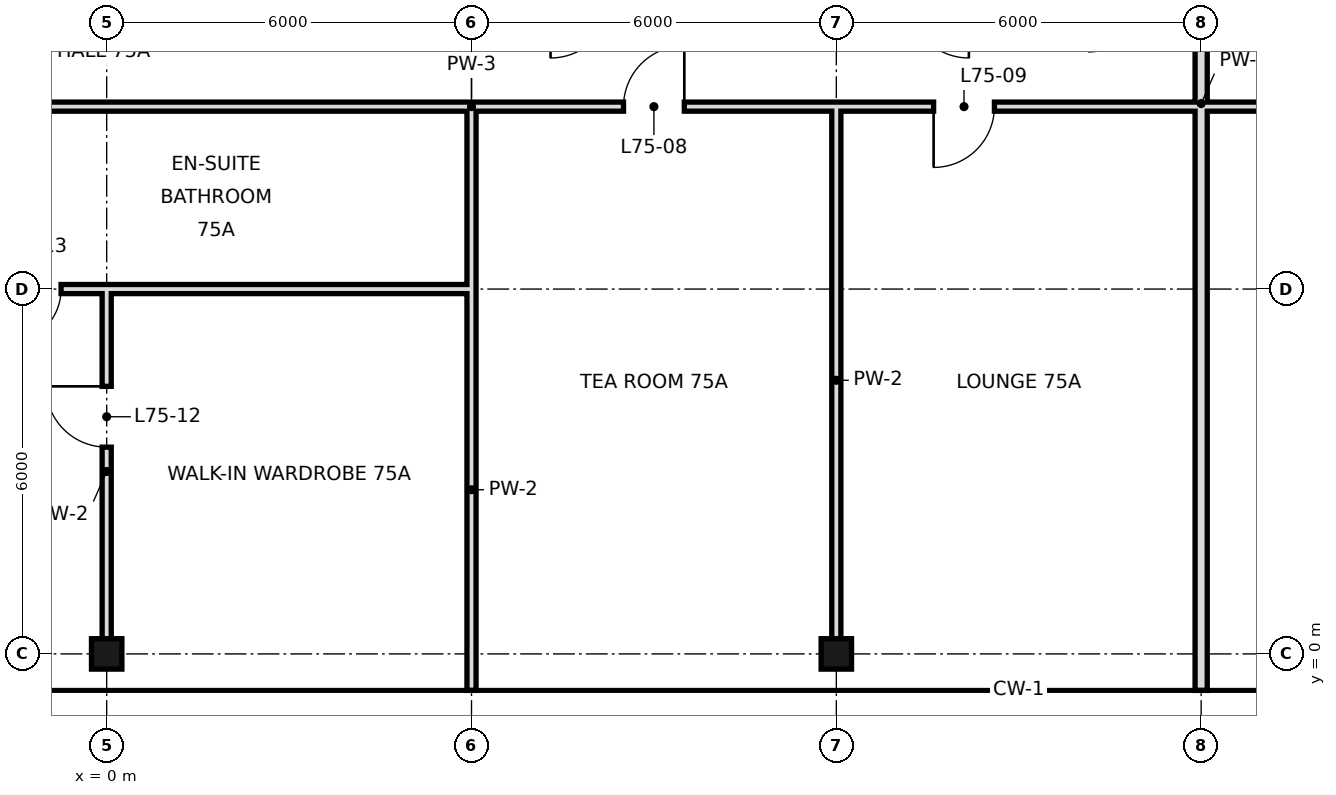
"""IFC4 building model, lengths in metres.
Left out: names, types, materials, properties, quantities, classifications, styles, units other than length and angle.
Written with IfcOpenShell. Run it as: python <this file> out.ifc"""

import sys

from ifc_helpers import new_model, si_unit, direction, frame, frame_2d, origin, origin_2d, place, context, subcontext, project, spatial, rectangle, hollow_rectangle, extrude, element, fill, save


model = new_model("IFC4")
c1 = context("Model", 3, precision=1e-05, world=origin(), true_north=direction((0.0, 1.0)))
c2 = subcontext(c1, "Body", "Model", "MODEL_VIEW")
j1 = project(units=[si_unit("LENGTHUNIT", "METRE"), si_unit("PLANEANGLEUNIT", "RADIAN")], contexts=[c1])
p1 = place(None, origin())
s1 = spatial("IfcSite", under=j1, at=p1, CompositionType="ELEMENT")
p2 = place(p1, origin())
s2 = spatial("IfcBuilding", under=s1, at=p2, CompositionType="ELEMENT")
p3 = place(p2, frame((0.0, 0.0, 316.0)))
s3 = spatial("IfcBuildingStorey", under=s2, at=p3, CompositionType="ELEMENT", Elevation=316.0)
for number, where, z_axis, x_axis in (
    (1, (0.0, 0.0, 0.0), (0.0, 0.0, 1.0), (1.0, 0.0, 0.0)),
    (2, (12.0, 0.0, 0.0), (0.0, 0.0, 1.0), (1.0, 0.0, 0.0)),
):
    element("IfcColumn", number, at=place(p3, frame(where, z_axis=z_axis, x_axis=x_axis)), inside=s3, PredefinedType="COLUMN", context=c2, shape_type="SweptSolid", body=[
        extrude(hollow_rectangle(XDim=0.5, YDim=0.5, WallThickness=0.025, at=origin_2d()), origin(), (0.0, 0.0, 1.0), 3.6),
    ])
p4 = place(p3, frame((0.0, 0.0, 0.0), z_axis=(0.0, 0.0, 1.0), x_axis=(0.0, 1.0, 0.0)))
e3 = element("IfcWall", 3, at=p4, inside=s3, PredefinedType="PARTITIONING", context=c2, shape_type="SweptSolid", body=[
    extrude(rectangle(XDim=6.0, YDim=0.15, at=frame_2d((3.0, 0.0))), origin(), (0.0, 0.0, 1.0), 2.72),
])
p5 = place(p4, frame((3.4, 0.0, 0.0)))
e4 = element("IfcOpeningElement", 4, at=p5, cuts=e3, PredefinedType="OPENING", context=c2, shape_type="SweptSolid", body=[
    extrude(rectangle(XDim=1.0, YDim=2.4, at=frame_2d((0.5, 1.2))), frame((0.0, 0.085, 0.0), z_axis=(0.0, -1.0, 0.0), x_axis=(1.0, 0.0, 0.0)), (0.0, 0.0, 1.0), 0.17),
])
p6 = place(p3, frame((12.0, 0.0, 0.0), z_axis=(0.0, 0.0, 1.0), x_axis=(0.0, 1.0, 0.0)))
e5 = element("IfcWall", 5, at=p6, inside=s3, PredefinedType="PARTITIONING", context=c2, shape_type="SweptSolid", body=[
    extrude(rectangle(XDim=9.0, YDim=0.15, at=frame_2d((4.5, 0.0))), origin(), (0.0, 0.0, 1.0), 2.72),
])
p7 = place(p3, frame((18.0, -0.6, 0.0), z_axis=(0.0, 0.0, 1.0), x_axis=(0.0, 1.0, 0.0)))
e6 = element("IfcWall", 6, at=p7, inside=s3, PredefinedType="SOLIDWALL", context=c2, shape_type="SweptSolid", body=[
    extrude(rectangle(XDim=19.3, YDim=0.2, at=frame_2d((9.65, 0.0))), origin(), (0.0, 0.0, 1.0), 2.72),
])
p8 = place(p3, frame((6.0, -0.6, 0.0), z_axis=(0.0, 0.0, 1.0), x_axis=(0.0, 1.0, 0.0)))
e7 = element("IfcWall", 7, at=p8, inside=s3, PredefinedType="PARTITIONING", context=c2, shape_type="SweptSolid", body=[
    extrude(rectangle(XDim=6.6, YDim=0.15, at=frame_2d((3.3, 0.0))), origin(), (0.0, 0.0, 1.0), 3.42),
])
p9 = place(p3, frame((6.0, 6.0, 0.0), z_axis=(0.0, 0.0, 1.0), x_axis=(0.0, 1.0, 0.0)))
e8 = element("IfcWall", 8, at=p9, inside=s3, PredefinedType="PARTITIONING", context=c2, shape_type="SweptSolid", body=[
    extrude(rectangle(XDim=3.0, YDim=0.15, at=frame_2d((1.5, 0.0))), origin(), (0.0, 0.0, 1.0), 3.42),
])
p10 = place(p3, frame((-2.4, 6.0, 0.0), z_axis=(0.0, 0.0, 1.0), x_axis=(1.0, 0.0, 0.0)))
e9 = element("IfcWall", 9, at=p10, inside=s3, PredefinedType="PARTITIONING", context=c2, shape_type="SweptSolid", body=[
    extrude(rectangle(XDim=8.4, YDim=0.15, at=frame_2d((4.2, 0.0))), origin(), (0.0, 0.0, 1.0), 2.72),
])
p11 = place(p10, frame((0.75, 0.0, 0.0)))
e10 = element("IfcOpeningElement", 10, at=p11, cuts=e9, PredefinedType="OPENING", context=c2, shape_type="SweptSolid", body=[
    extrude(rectangle(XDim=0.9, YDim=2.4, at=frame_2d((0.45, 1.2))), frame((0.0, 0.085, 0.0), z_axis=(0.0, -1.0, 0.0), x_axis=(1.0, 0.0, 0.0)), (0.0, 0.0, 1.0), 0.17),
])
p12 = place(p3, frame((6.0, 9.0, 0.0), z_axis=(0.0, 0.0, 1.0), x_axis=(1.0, 0.0, 0.0)))
e11 = element("IfcWall", 11, at=p12, inside=s3, PredefinedType="PARTITIONING", context=c2, shape_type="SweptSolid", body=[
    extrude(rectangle(XDim=30.0, YDim=0.15, at=frame_2d((15.0, 0.0))), origin(), (0.0, 0.0, 1.0), 3.42),
])
p13 = place(p12, frame((2.5, 0.0, 0.0)))
e12 = element("IfcOpeningElement", 12, at=p13, cuts=e11, PredefinedType="OPENING", context=c2, shape_type="SweptSolid", body=[
    extrude(rectangle(XDim=1.0, YDim=2.4, at=frame_2d((0.5, 1.2))), frame((0.0, 0.085, 0.0), z_axis=(0.0, -1.0, 0.0), x_axis=(1.0, 0.0, 0.0)), (0.0, 0.0, 1.0), 0.17),
])
p14 = place(p12, frame((7.6, 0.0, 0.0)))
e13 = element("IfcOpeningElement", 13, at=p14, cuts=e11, PredefinedType="OPENING", context=c2, shape_type="SweptSolid", body=[
    extrude(rectangle(XDim=1.0, YDim=2.4, at=frame_2d((0.5, 1.2))), frame((0.0, 0.085, 0.0), z_axis=(0.0, -1.0, 0.0), x_axis=(1.0, 0.0, 0.0)), (0.0, 0.0, 1.0), 0.17),
])
p15 = place(p12, frame((15.4, 0.0, 0.0)))
e14 = element("IfcOpeningElement", 14, at=p15, cuts=e11, PredefinedType="OPENING", context=c2, shape_type="SweptSolid", body=[
    extrude(rectangle(XDim=1.0, YDim=2.4, at=frame_2d((0.5, 1.2))), frame((0.0, 0.085, 0.0), z_axis=(0.0, -1.0, 0.0), x_axis=(1.0, 0.0, 0.0)), (0.0, 0.0, 1.0), 0.17),
])
p16 = place(p12, frame((25.04, 0.0, 0.0)))
e15 = element("IfcOpeningElement", 15, at=p16, cuts=e11, PredefinedType="OPENING", context=c2, shape_type="SweptSolid", body=[
    extrude(rectangle(XDim=1.8, YDim=2.4, at=frame_2d((0.9, 1.2))), frame((0.0, 0.085, 0.0), z_axis=(0.0, -1.0, 0.0), x_axis=(1.0, 0.0, 0.0)), (0.0, 0.0, 1.0), 0.17),
])
p17 = place(p3, frame((-2.4, 9.0, 0.0), z_axis=(0.0, 0.0, 1.0), x_axis=(1.0, 0.0, 0.0)))
e16 = element("IfcWall", 16, at=p17, inside=s3, PredefinedType="PARTITIONING", context=c2, shape_type="SweptSolid", body=[
    extrude(rectangle(XDim=8.4, YDim=0.15, at=frame_2d((4.2, 0.0))), origin(), (0.0, 0.0, 1.0), 3.42),
])
p18 = place(p13, frame((1.0, 0.0, 0.0), z_axis=(0.0, 0.0, 1.0), x_axis=(-1.0, 0.0, 0.0)))
e17 = element("IfcDoor", 17, at=p18, inside=s3, OperationType="SINGLE_SWING_LEFT", PredefinedType="DOOR", context=c2, shape_type="SweptSolid", body=[
    extrude(rectangle(XDim=1.0, YDim=2.4, at=frame_2d((0.5, 1.2))), frame((0.0, 0.025, 0.0), z_axis=(0.0, -1.0, 0.0), x_axis=(1.0, 0.0, 0.0)), (0.0, 0.0, 1.0), 0.05),
])
fill(e12, e17)
p19 = place(p14, frame((1.0, 0.0, 0.0), z_axis=(0.0, 0.0, 1.0), x_axis=(-1.0, 0.0, 0.0)))
e18 = element("IfcDoor", 18, at=p19, inside=s3, OperationType="SINGLE_SWING_RIGHT", PredefinedType="DOOR", context=c2, shape_type="SweptSolid", body=[
    extrude(rectangle(XDim=1.0, YDim=2.4, at=frame_2d((0.5, 1.2))), frame((0.0, 0.025, 0.0), z_axis=(0.0, -1.0, 0.0), x_axis=(1.0, 0.0, 0.0)), (0.0, 0.0, 1.0), 0.05),
])
fill(e13, e18)
p20 = place(p5, frame((1.0, 0.0, 0.0), z_axis=(0.0, 0.0, 1.0), x_axis=(-1.0, 0.0, 0.0)))
e19 = element("IfcDoor", 19, at=p20, inside=s3, OperationType="SINGLE_SWING_LEFT", PredefinedType="DOOR", context=c2, shape_type="SweptSolid", body=[
    extrude(rectangle(XDim=1.0, YDim=2.4, at=frame_2d((0.5, 1.2))), frame((0.0, 0.025, 0.0), z_axis=(0.0, -1.0, 0.0), x_axis=(1.0, 0.0, 0.0)), (0.0, 0.0, 1.0), 0.05),
])
fill(e4, e19)
p21 = place(p11, frame((0.9, 0.0, 0.0), z_axis=(0.0, 0.0, 1.0), x_axis=(-1.0, 0.0, 0.0)))
e20 = element("IfcDoor", 20, at=p21, inside=s3, OperationType="SINGLE_SWING_RIGHT", PredefinedType="DOOR", context=c2, shape_type="SweptSolid", body=[
    extrude(rectangle(XDim=0.9, YDim=2.4, at=frame_2d((0.45, 1.2))), frame((0.0, 0.025, 0.0), z_axis=(0.0, -1.0, 0.0), x_axis=(1.0, 0.0, 0.0)), (0.0, 0.0, 1.0), 0.05),
])
fill(e10, e20)
save(model, sys.argv[1])
